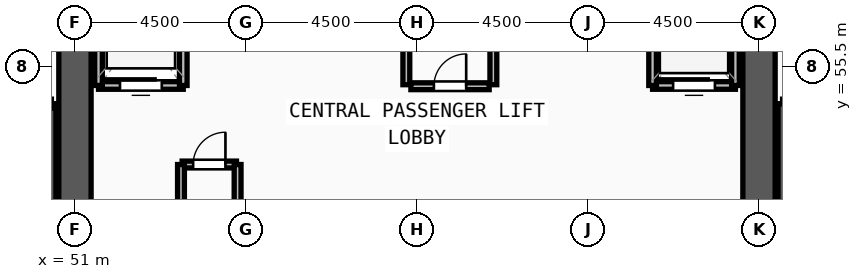
"""IFC4 building model, lengths in metres.
Left out: names, types, materials, properties, quantities, classifications, styles, units other than length and angle.
Written with IfcOpenShell. Run it as: python <this file> out.ifc"""

import sys

from ifc_helpers import new_model, si_unit, direction, frame, frame_2d, origin, place, context, subcontext, project, spatial, rectangle, extrude, source, transform, mapped, element, fill, save


model = new_model("IFC4")
c1 = context("Model", 3, precision=1e-05, world=origin(), true_north=direction((0.0, 1.0)))
c2 = subcontext(c1, "Body", "Model", "MODEL_VIEW")
j1 = project(units=[si_unit("LENGTHUNIT", "METRE"), si_unit("PLANEANGLEUNIT", "RADIAN")], contexts=[c1])
p1 = place(None, origin())
s1 = spatial("IfcSite", under=j1, at=p1, CompositionType="ELEMENT")
p2 = place(p1, origin())
s2 = spatial("IfcBuilding", under=s1, at=p2, CompositionType="ELEMENT")
p3 = place(p2, frame((0.0, 0.0, -4.8)))
s3 = spatial("IfcBuildingStorey", under=s2, at=p3, CompositionType="ELEMENT", Elevation=-4.8)
p4 = place(p3, frame((69.0, 60.6, 0.0), z_axis=(0.0, 0.0, 1.0), x_axis=(0.0, -1.0, 0.0)))
e1 = element("IfcWall", 1, at=p4, inside=s3, PredefinedType="SHEAR", context=c2, shape_type="SweptSolid", body=[
    extrude(rectangle(XDim=13.2, YDim=0.85, at=frame_2d((6.6, 0.0))), origin(), (0.0, 0.0, 1.0), 4.55),
])
m1 = source(origin(), c2, "Body", "SweptSolid", [
    extrude(rectangle(XDim=1.2, YDim=2.2, at=frame_2d((0.6, 1.1))), frame((0.0, 0.435, 0.0), z_axis=(0.0, -1.0, 0.0), x_axis=(1.0, 0.0, 0.0)), (0.0, 0.0, 1.0), 0.87),
])
p5 = place(p4, frame((1.05, 0.0, 0.0)))
e2 = element("IfcOpeningElement", 2, at=p5, cuts=e1, PredefinedType="OPENING", context=c2, shape_type="MappedRepresentation", body=[
    mapped(m1, transform((0.0, 0.0, 0.0), x_axis=(1.0, 0.0, 0.0), y_axis=(0.0, 1.0, 0.0), z_axis=(0.0, 0.0, 1.0), scale=1.0)),
])
p6 = place(p3, frame((51.0, 47.4, 0.0), z_axis=(0.0, 0.0, 1.0), x_axis=(0.0, 1.0, 0.0)))
e3 = element("IfcWall", 3, at=p6, inside=s3, PredefinedType="SHEAR", context=c2, shape_type="SweptSolid", body=[
    extrude(rectangle(XDim=13.2, YDim=0.85, at=frame_2d((6.6, 0.0))), origin(), (0.0, 0.0, 1.0), 4.55),
])
m2 = source(origin(), c2, "Body", "SweptSolid", [
    extrude(rectangle(XDim=1.1, YDim=2.2, at=frame_2d((0.55, 1.1))), frame((0.0, 0.435, 0.0), z_axis=(0.0, -1.0, 0.0), x_axis=(1.0, 0.0, 0.0)), (0.0, 0.0, 1.0), 0.87),
])
p7 = place(p6, frame((11.5, 0.0, 0.0)))
e4 = element("IfcOpeningElement", 4, at=p7, cuts=e3, PredefinedType="OPENING", context=c2, shape_type="MappedRepresentation", body=[
    mapped(m2, transform((0.0, 0.0, 0.0), x_axis=(1.0, 0.0, 0.0), y_axis=(0.0, 1.0, 0.0), z_axis=(0.0, 0.0, 1.0), scale=1.0)),
])
for number, where, z_axis, x_axis in (
    (5, (50.38, 46.7, 0.0), (0.0, 0.0, 1.0), (0.0, 1.0, 0.0)),
    (6, (69.62, 54.52, 0.0), (0.0, 0.0, 1.0), (0.0, -1.0, 0.0)),
):
    element("IfcWall", number, at=place(p3, frame(where, z_axis=z_axis, x_axis=x_axis)), inside=s3, PredefinedType="SOLIDWALL", context=c2, shape_type="SweptSolid", body=[
        extrude(rectangle(XDim=7.82, YDim=0.24, at=frame_2d((3.91, 0.0))), origin(), (0.0, 0.0, 1.0), 4.55),
    ])
p8 = place(p3, frame((51.62, 55.0, 0.0), z_axis=(0.0, 0.0, 1.0), x_axis=(1.0, 0.0, 0.0)))
e7 = element("IfcWall", 7, at=p8, inside=s3, PredefinedType="SOLIDWALL", context=c2, shape_type="SweptSolid", body=[
    extrude(rectangle(XDim=2.23, YDim=0.2, at=frame_2d((1.115, 0.0))), origin(), (0.0, 0.0, 1.0), 4.55),
])
m3 = source(origin(), c2, "Body", "SweptSolid", [
    extrude(rectangle(XDim=1.1, YDim=2.2, at=frame_2d((0.55, 1.1))), frame((0.0, 0.11, 0.0), z_axis=(0.0, -1.0, 0.0), x_axis=(1.0, 0.0, 0.0)), (0.0, 0.0, 1.0), 0.22),
])
p9 = place(p8, frame((0.565, 0.0, 0.0)))
e8 = element("IfcOpeningElement", 8, at=p9, cuts=e7, PredefinedType="OPENING", context=c2, shape_type="MappedRepresentation", body=[
    mapped(m3, transform((0.0, 0.0, 0.0), x_axis=(1.0, 0.0, 0.0), y_axis=(0.0, 1.0, 0.0), z_axis=(0.0, 0.0, 1.0), scale=1.0)),
])
for number, where, z_axis, x_axis in (
    (9, (53.85, 55.0, 0.0), (0.0, 0.0, 1.0), (0.0, 1.0, 0.0)),
    (10, (51.62, 58.0, 0.0), (0.0, 0.0, 1.0), (0.0, -1.0, 0.0)),
):
    element("IfcWall", number, at=place(p3, frame(where, z_axis=z_axis, x_axis=x_axis)), inside=s3, PredefinedType="SOLIDWALL", context=c2, shape_type="SweptSolid", body=[
        extrude(rectangle(XDim=3.0, YDim=0.2, at=frame_2d((1.5, 0.0))), origin(), (0.0, 0.0, 1.0), 4.55),
    ])
p10 = place(p3, frame((66.2, 55.0, 0.0), z_axis=(0.0, 0.0, 1.0), x_axis=(1.0, 0.0, 0.0)))
e11 = element("IfcWall", 11, at=p10, inside=s3, PredefinedType="SOLIDWALL", context=c2, shape_type="SweptSolid", body=[
    extrude(rectangle(XDim=2.18, YDim=0.2, at=frame_2d((1.09, 0.0))), origin(), (0.0, 0.0, 1.0), 4.55),
])
p11 = place(p10, frame((0.54, 0.0, 0.0)))
e12 = element("IfcOpeningElement", 12, at=p11, cuts=e11, PredefinedType="OPENING", context=c2, shape_type="MappedRepresentation", body=[
    mapped(m3, transform((0.0, 0.0, 0.0), x_axis=(1.0, 0.0, 0.0), y_axis=(0.0, 1.0, 0.0), z_axis=(0.0, 0.0, 1.0), scale=1.0)),
])
for number, where, z_axis, x_axis in (
    (13, (68.38, 55.0, 0.0), (0.0, 0.0, 1.0), (0.0, 1.0, 0.0)),
    (14, (66.2, 57.75, 0.0), (0.0, 0.0, 1.0), (0.0, -1.0, 0.0)),
):
    element("IfcWall", number, at=place(p3, frame(where, z_axis=z_axis, x_axis=x_axis)), inside=s3, PredefinedType="SOLIDWALL", context=c2, shape_type="SweptSolid", body=[
        extrude(rectangle(XDim=2.75, YDim=0.2, at=frame_2d((1.375, 0.0))), origin(), (0.0, 0.0, 1.0), 4.55),
    ])
p12 = place(p3, frame((59.84, 54.98, 0.0), z_axis=(0.0, 0.0, 1.0), x_axis=(1.0, 0.0, 0.0)))
e15 = element("IfcWall", 15, at=p12, inside=s3, PredefinedType="PARTITIONING", context=c2, shape_type="SweptSolid", body=[
    extrude(rectangle(XDim=2.06, YDim=0.18, at=frame_2d((1.03, 0.0))), origin(), (0.0, 0.0, 1.0), 4.55),
])
m4 = source(origin(), c2, "Body", "SweptSolid", [
    extrude(rectangle(XDim=0.85, YDim=2.1, at=frame_2d((0.425, 1.05))), frame((0.0, 0.1, 0.0), z_axis=(0.0, -1.0, 0.0), x_axis=(1.0, 0.0, 0.0)), (0.0, 0.0, 1.0), 0.2),
])
p13 = place(p12, frame((0.605, 0.0, 0.0)))
e16 = element("IfcOpeningElement", 16, at=p13, cuts=e15, PredefinedType="OPENING", context=c2, shape_type="MappedRepresentation", body=[
    mapped(m4, transform((0.0, 0.0, 0.0), x_axis=(1.0, 0.0, 0.0), y_axis=(0.0, 1.0, 0.0), z_axis=(0.0, 0.0, 1.0), scale=1.0)),
])
p14 = place(p3, frame((53.82, 52.92, 0.0), z_axis=(0.0, 0.0, 1.0), x_axis=(1.0, 0.0, 0.0)))
e17 = element("IfcWall", 17, at=p14, inside=s3, PredefinedType="PARTITIONING", context=c2, shape_type="SweptSolid", body=[
    extrude(rectangle(XDim=1.43, YDim=0.18, at=frame_2d((0.715, 0.0))), origin(), (0.0, 0.0, 1.0), 4.55),
])
p15 = place(p14, frame((0.29, 0.0, 0.0)))
e18 = element("IfcOpeningElement", 18, at=p15, cuts=e17, PredefinedType="OPENING", context=c2, shape_type="MappedRepresentation", body=[
    mapped(m4, transform((0.0, 0.0, 0.0), x_axis=(1.0, 0.0, 0.0), y_axis=(0.0, 1.0, 0.0), z_axis=(0.0, 0.0, 1.0), scale=1.0)),
])
for number, where, z_axis, x_axis in (
    (19, (59.72, 55.02, 0.0), (0.0, 0.0, 1.0), (0.0, 1.0, 0.0)),
    (20, (62.01, 55.02, 0.0), (0.0, 0.0, 1.0), (0.0, 1.0, 0.0)),
):
    element("IfcWall", number, at=place(p3, frame(where, z_axis=z_axis, x_axis=x_axis)), inside=s3, PredefinedType="PARTITIONING", context=c2, shape_type="SweptSolid", body=[
        extrude(rectangle(XDim=2.88, YDim=0.18, at=frame_2d((1.44, 0.0))), origin(), (0.0, 0.0, 1.0), 4.55),
    ])
for number, where, z_axis, x_axis in (
    (21, (53.79, 50.35, 0.0), (0.0, 0.0, 1.0), (0.0, 1.0, 0.0)),
    (22, (55.28, 50.35, 0.0), (0.0, 0.0, 1.0), (0.0, 1.0, 0.0)),
):
    element("IfcWall", number, at=place(p3, frame(where, z_axis=z_axis, x_axis=x_axis)), inside=s3, PredefinedType="PARTITIONING", context=c2, shape_type="SweptSolid", body=[
        extrude(rectangle(XDim=2.57, YDim=0.18, at=frame_2d((1.285, 0.0))), origin(), (0.0, 0.0, 1.0), 4.55),
    ])
m5 = source(origin(), c2, "Body", "SweptSolid", [
    extrude(rectangle(XDim=1.1, YDim=2.2, at=frame_2d((0.55, 1.1))), frame((0.0, 0.025, 0.0), z_axis=(0.0, -1.0, 0.0), x_axis=(1.0, 0.0, 0.0)), (0.0, 0.0, 1.0), 0.05),
])
p16 = place(p9, origin())
e23 = element("IfcDoor", 23, at=p16, inside=s3, OperationType="SLIDING_TO_LEFT", PredefinedType="DOOR", context=c2, shape_type="MappedRepresentation", body=[
    mapped(m5, transform((0.0, 0.0, 0.0), x_axis=(1.0, 0.0, 0.0), y_axis=(0.0, 1.0, 0.0), z_axis=(0.0, 0.0, 1.0), scale=1.0)),
])
fill(e8, e23)
p17 = place(p11, origin())
e24 = element("IfcDoor", 24, at=p17, inside=s3, OperationType="SLIDING_TO_LEFT", PredefinedType="DOOR", context=c2, shape_type="MappedRepresentation", body=[
    mapped(m5, transform((0.0, 0.0, 0.0), x_axis=(1.0, 0.0, 0.0), y_axis=(0.0, 1.0, 0.0), z_axis=(0.0, 0.0, 1.0), scale=1.0)),
])
fill(e12, e24)
m6 = source(origin(), c2, "Body", "SweptSolid", [
    extrude(rectangle(XDim=0.85, YDim=2.1, at=frame_2d((0.425, 1.05))), frame((0.0, 0.025, 0.0), z_axis=(0.0, -1.0, 0.0), x_axis=(1.0, 0.0, 0.0)), (0.0, 0.0, 1.0), 0.05),
])
p18 = place(p13, origin())
e25 = element("IfcDoor", 25, at=p18, inside=s3, OperationType="SINGLE_SWING_RIGHT", PredefinedType="DOOR", context=c2, shape_type="MappedRepresentation", body=[
    mapped(m6, transform((0.0, 0.0, 0.0), x_axis=(1.0, 0.0, 0.0), y_axis=(0.0, 1.0, 0.0), z_axis=(0.0, 0.0, 1.0), scale=1.0)),
])
fill(e16, e25)
p19 = place(p15, origin())
e26 = element("IfcDoor", 26, at=p19, inside=s3, OperationType="SINGLE_SWING_RIGHT", PredefinedType="DOOR", context=c2, shape_type="MappedRepresentation", body=[
    mapped(m6, transform((0.0, 0.0, 0.0), x_axis=(1.0, 0.0, 0.0), y_axis=(0.0, 1.0, 0.0), z_axis=(0.0, 0.0, 1.0), scale=1.0)),
])
fill(e18, e26)
save(model, sys.argv[1])
